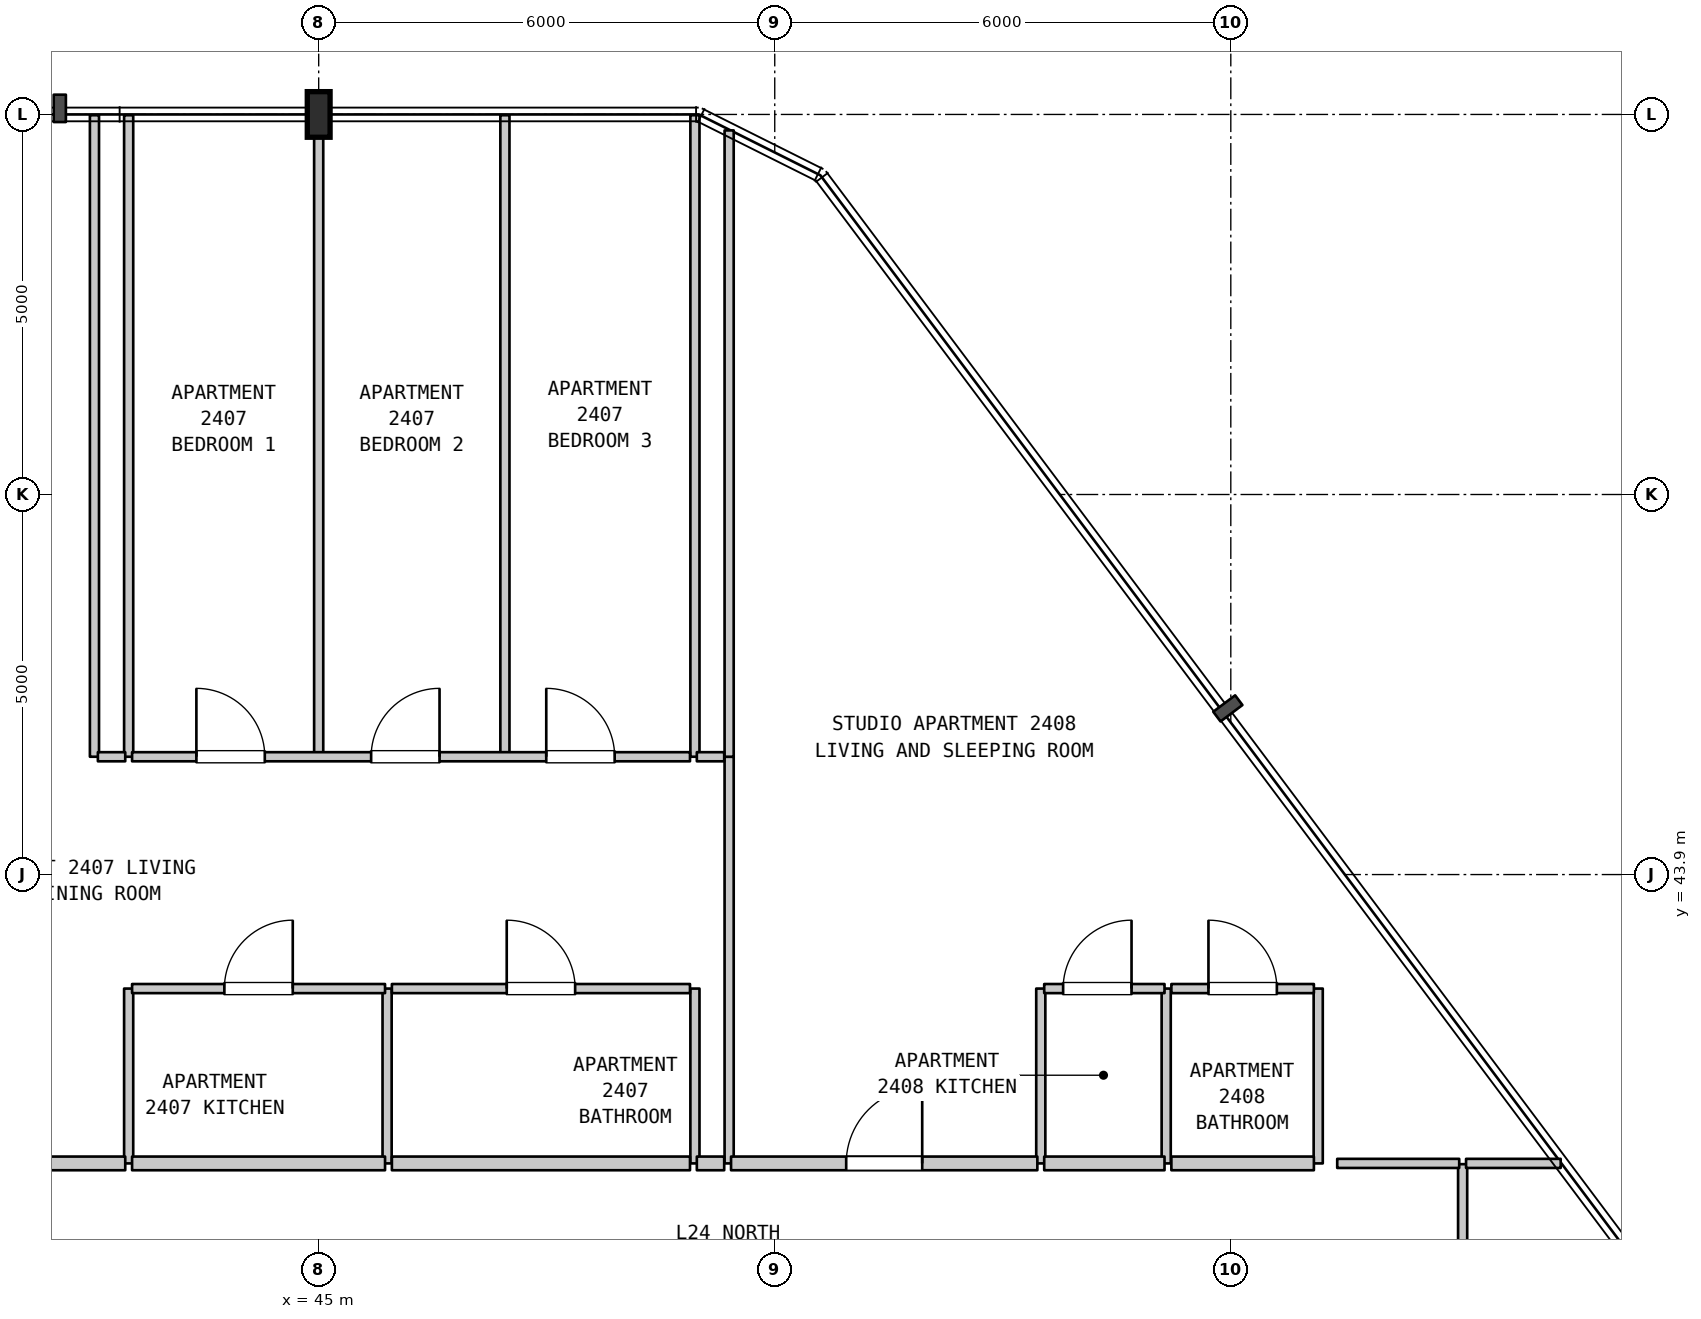
"""IFC4 building model, lengths in metres.
Left out: names, types, materials, properties, quantities, classifications, styles, units other than length and angle.
Written with IfcOpenShell. Run it as: python <this file> out.ifc"""

import sys

from ifc_helpers import new_model, si_unit, direction, frame, frame_2d, origin, origin_2d, place, context, subcontext, project, spatial, rectangle, i_section, extrude, element, fill, save


model = new_model("IFC4")
c1 = context("Model", 3, precision=1e-05, world=origin(), true_north=direction((0.0, 1.0)))
c2 = subcontext(c1, "Body", "Model", "MODEL_VIEW")
j1 = project(units=[si_unit("LENGTHUNIT", "METRE"), si_unit("PLANEANGLEUNIT", "RADIAN")], contexts=[c1])
p1 = place(None, origin())
s1 = spatial("IfcSite", under=j1, at=p1, CompositionType="ELEMENT")
p2 = place(p1, origin())
s2 = spatial("IfcBuilding", under=s1, at=p2, CompositionType="ELEMENT")
p3 = place(p2, frame((0.0, 0.0, 102.0)))
s3 = spatial("IfcBuildingStorey", under=s2, at=p3, CompositionType="ELEMENT", Elevation=102.0)
p4 = place(p3, frame((45.0, 53.9, 0.0), z_axis=(0.0, 0.0, 1.0), x_axis=(1.0, 0.0, 0.0)))
e1 = element("IfcColumn", 1, at=p4, inside=s3, PredefinedType="COLUMN", context=c2, shape_type="SweptSolid", body=[
    extrude(i_section(OverallWidth=0.3, OverallDepth=0.6, WebThickness=0.015, FlangeThickness=0.03, FilletRadius=0.027, at=origin_2d()), origin(), (0.0, 0.0, 1.0), 3.7),
])
p5 = place(p3, frame((42.05, 45.45, 0.0), z_axis=(0.0, 0.0, 1.0), x_axis=(0.0, 1.0, 0.0)))
e2 = element("IfcWall", 2, at=p5, inside=s3, PredefinedType="PARTITIONING", context=c2, shape_type="SweptSolid", body=[
    extrude(rectangle(XDim=8.44, YDim=0.12, at=frame_2d((4.22, 0.0))), origin(), (0.0, 0.0, 1.0), 3.385),
])
p6 = place(p3, frame((42.5, 40.1, 0.0), z_axis=(0.0, 0.0, 1.0), x_axis=(0.0, 1.0, 0.0)))
e3 = element("IfcWall", 3, at=p6, inside=s3, PredefinedType="PARTITIONING", context=c2, shape_type="SweptSolid", body=[
    extrude(rectangle(XDim=2.3, YDim=0.12, at=frame_2d((1.15, 0.0))), origin(), (0.0, 0.0, 1.0), 3.385),
])
for number, where, z_axis, x_axis in (
    (4, (42.5, 45.45, 0.0), (0.0, 0.0, 1.0), (0.0, 1.0, 0.0)),
    (5, (45.0, 45.45, 0.0), (0.0, 0.0, 1.0), (0.0, 1.0, 0.0)),
):
    element("IfcWall", number, at=place(p3, frame(where, z_axis=z_axis, x_axis=x_axis)), inside=s3, PredefinedType="PARTITIONING", context=c2, shape_type="SweptSolid", body=[
        extrude(rectangle(XDim=8.44, YDim=0.12, at=frame_2d((4.22, 0.0))), origin(), (0.0, 0.0, 1.0), 3.385),
    ])
p7 = place(p3, frame((45.9, 40.1, 0.0), z_axis=(0.0, 0.0, 1.0), x_axis=(0.0, 1.0, 0.0)))
e6 = element("IfcWall", 6, at=p7, inside=s3, PredefinedType="PARTITIONING", context=c2, shape_type="SweptSolid", body=[
    extrude(rectangle(XDim=2.3, YDim=0.12, at=frame_2d((1.15, 0.0))), origin(), (0.0, 0.0, 1.0), 3.385),
])
p8 = place(p3, frame((47.45, 45.45, 0.0), z_axis=(0.0, 0.0, 1.0), x_axis=(0.0, 1.0, 0.0)))
e7 = element("IfcWall", 7, at=p8, inside=s3, PredefinedType="PARTITIONING", context=c2, shape_type="SweptSolid", body=[
    extrude(rectangle(XDim=8.44, YDim=0.12, at=frame_2d((4.22, 0.0))), origin(), (0.0, 0.0, 1.0), 3.385),
])
p9 = place(p3, frame((49.95, 40.1, 0.0), z_axis=(0.0, 0.0, 1.0), x_axis=(0.0, 1.0, 0.0)))
e8 = element("IfcWall", 8, at=p9, inside=s3, PredefinedType="PARTITIONING", context=c2, shape_type="SweptSolid", body=[
    extrude(rectangle(XDim=2.3, YDim=0.12, at=frame_2d((1.15, 0.0))), origin(), (0.0, 0.0, 1.0), 3.385),
])
p10 = place(p3, frame((49.95, 45.45, 0.0), z_axis=(0.0, 0.0, 1.0), x_axis=(0.0, 1.0, 0.0)))
e9 = element("IfcWall", 9, at=p10, inside=s3, PredefinedType="PARTITIONING", context=c2, shape_type="SweptSolid", body=[
    extrude(rectangle(XDim=8.44, YDim=0.12, at=frame_2d((4.22, 0.0))), origin(), (0.0, 0.0, 1.0), 3.385),
])
p11 = place(p3, frame((50.4, 40.1, 0.0), z_axis=(0.0, 0.0, 1.0), x_axis=(0.0, 1.0, 0.0)))
e10 = element("IfcWall", 10, at=p11, inside=s3, PredefinedType="PARTITIONING", context=c2, shape_type="SweptSolid", body=[
    extrude(rectangle(XDim=5.35, YDim=0.12, at=frame_2d((2.675, 0.0))), origin(), (0.0, 0.0, 1.0), 3.385),
])
p12 = place(p3, frame((50.4, 45.45, 0.0), z_axis=(0.0, 0.0, 1.0), x_axis=(0.0, 1.0, 0.0)))
e11 = element("IfcWall", 11, at=p12, inside=s3, PredefinedType="PARTITIONING", context=c2, shape_type="SweptSolid", body=[
    extrude(rectangle(XDim=8.24, YDim=0.12, at=frame_2d((4.12, 0.0))), origin(), (0.0, 0.0, 1.0), 3.385),
])
for number, where, z_axis, x_axis in (
    (12, (54.5, 40.1, 0.0), (0.0, 0.0, 1.0), (0.0, 1.0, 0.0)),
    (13, (56.15, 40.1, 0.0), (0.0, 0.0, 1.0), (0.0, 1.0, 0.0)),
    (14, (58.15, 40.1, 0.0), (0.0, 0.0, 1.0), (0.0, 1.0, 0.0)),
):
    element("IfcWall", number, at=place(p3, frame(where, z_axis=z_axis, x_axis=x_axis)), inside=s3, PredefinedType="PARTITIONING", context=c2, shape_type="SweptSolid", body=[
        extrude(rectangle(XDim=2.3, YDim=0.12, at=frame_2d((1.15, 0.0))), origin(), (0.0, 0.0, 1.0), 3.385),
    ])
p13 = place(p3, frame((60.05, 37.89, 0.0), z_axis=(0.0, 0.0, 1.0), x_axis=(0.0, 1.0, 0.0)))
e15 = element("IfcWall", 15, at=p13, inside=s3, PredefinedType="PARTITIONING", context=c2, shape_type="SweptSolid", body=[
    extrude(rectangle(XDim=2.2, YDim=0.12, at=frame_2d((1.1, 0.0))), origin(), (0.0, 0.0, 1.0), 3.385),
])
p14 = place(p3, frame((37.155, 40.1, 0.0), z_axis=(0.0, 0.0, 1.0), x_axis=(1.0, 0.0, 0.0)))
e16 = element("IfcWall", 16, at=p14, inside=s3, PredefinedType="STANDARD", context=c2, shape_type="SweptSolid", body=[
    extrude(rectangle(XDim=5.3, YDim=0.18, at=frame_2d((2.65, 0.0))), origin(), (0.0, 0.0, 1.0), 3.385),
])
p15 = place(p14, frame((2.15, 0.0, 0.0)))
e17 = element("IfcOpeningElement", 17, at=p15, cuts=e16, PredefinedType="OPENING", context=c2, shape_type="SweptSolid", body=[
    extrude(rectangle(XDim=1.0, YDim=2.15, at=frame_2d((0.5, 1.075))), frame((0.0, 0.1, 0.0), z_axis=(0.0, -1.0, 0.0), x_axis=(1.0, 0.0, 0.0)), (0.0, 0.0, 1.0), 0.2),
])
p16 = place(p3, frame((42.545, 40.1, 0.0), z_axis=(0.0, 0.0, 1.0), x_axis=(1.0, 0.0, 0.0)))
e18 = element("IfcWall", 18, at=p16, inside=s3, PredefinedType="STANDARD", context=c2, shape_type="SweptSolid", body=[
    extrude(rectangle(XDim=3.328, YDim=0.18, at=frame_2d((1.664, 0.0))), origin(), (0.0, 0.0, 1.0), 3.385),
])
p17 = place(p3, frame((45.963, 40.1, 0.0), z_axis=(0.0, 0.0, 1.0), x_axis=(1.0, 0.0, 0.0)))
e19 = element("IfcWall", 19, at=p17, inside=s3, PredefinedType="STANDARD", context=c2, shape_type="SweptSolid", body=[
    extrude(rectangle(XDim=3.922, YDim=0.18, at=frame_2d((1.961, 0.0))), origin(), (0.0, 0.0, 1.0), 3.385),
])
p18 = place(p3, frame((49.975, 40.1, 0.0), z_axis=(0.0, 0.0, 1.0), x_axis=(1.0, 0.0, 0.0)))
e20 = element("IfcWall", 20, at=p18, inside=s3, PredefinedType="STANDARD", context=c2, shape_type="SweptSolid", body=[
    extrude(rectangle(XDim=0.36, YDim=0.18, at=frame_2d((0.18, 0.0))), origin(), (0.0, 0.0, 1.0), 3.385),
])
p19 = place(p3, frame((50.425, 40.1, 0.0), z_axis=(0.0, 0.0, 1.0), x_axis=(1.0, 0.0, 0.0)))
e21 = element("IfcWall", 21, at=p19, inside=s3, PredefinedType="STANDARD", context=c2, shape_type="SweptSolid", body=[
    extrude(rectangle(XDim=4.03, YDim=0.18, at=frame_2d((2.015, 0.0))), origin(), (0.0, 0.0, 1.0), 3.385),
])
p20 = place(p19, frame((1.515, 0.0, 0.0)))
e22 = element("IfcOpeningElement", 22, at=p20, cuts=e21, PredefinedType="OPENING", context=c2, shape_type="SweptSolid", body=[
    extrude(rectangle(XDim=1.0, YDim=2.15, at=frame_2d((0.5, 1.075))), frame((0.0, 0.1, 0.0), z_axis=(0.0, -1.0, 0.0), x_axis=(1.0, 0.0, 0.0)), (0.0, 0.0, 1.0), 0.2),
])
p21 = place(p3, frame((54.545, 40.1, 0.0), z_axis=(0.0, 0.0, 1.0), x_axis=(1.0, 0.0, 0.0)))
e23 = element("IfcWall", 23, at=p21, inside=s3, PredefinedType="STANDARD", context=c2, shape_type="SweptSolid", body=[
    extrude(rectangle(XDim=1.583, YDim=0.18, at=frame_2d((0.792, 0.0))), origin(), (0.0, 0.0, 1.0), 3.385),
])
p22 = place(p3, frame((56.218, 40.1, 0.0), z_axis=(0.0, 0.0, 1.0), x_axis=(1.0, 0.0, 0.0)))
e24 = element("IfcWall", 24, at=p22, inside=s3, PredefinedType="STANDARD", context=c2, shape_type="SweptSolid", body=[
    extrude(rectangle(XDim=1.875, YDim=0.18, at=frame_2d((0.938, 0.0))), origin(), (0.0, 0.0, 1.0), 3.385),
])
p23 = place(p3, frame((58.4, 40.1, 0.0), z_axis=(0.0, 0.0, 1.0), x_axis=(1.0, 0.0, 0.0)))
e25 = element("IfcWall", 25, at=p23, inside=s3, PredefinedType="PARTITIONING", context=c2, shape_type="SweptSolid", body=[
    extrude(rectangle(XDim=1.605, YDim=0.12, at=frame_2d((0.802, 0.0))), origin(), (0.0, 0.0, 1.0), 3.385),
])
p24 = place(p3, frame((60.095, 40.1, 0.0), z_axis=(0.0, 0.0, 1.0), x_axis=(1.0, 0.0, 0.0)))
e26 = element("IfcWall", 26, at=p24, inside=s3, PredefinedType="PARTITIONING", context=c2, shape_type="SweptSolid", body=[
    extrude(rectangle(XDim=1.245, YDim=0.12, at=frame_2d((0.623, 0.0))), origin(), (0.0, 0.0, 1.0), 3.385),
])
p25 = place(p3, frame((42.545, 42.4, 0.0), z_axis=(0.0, 0.0, 1.0), x_axis=(1.0, 0.0, 0.0)))
e27 = element("IfcWall", 27, at=p25, inside=s3, PredefinedType="PARTITIONING", context=c2, shape_type="SweptSolid", body=[
    extrude(rectangle(XDim=3.328, YDim=0.12, at=frame_2d((1.664, 0.0))), origin(), (0.0, 0.0, 1.0), 3.385),
])
p26 = place(p25, frame((1.214, 0.0, 0.0)))
e28 = element("IfcOpeningElement", 28, at=p26, cuts=e27, PredefinedType="OPENING", context=c2, shape_type="SweptSolid", body=[
    extrude(rectangle(XDim=0.9, YDim=2.15, at=frame_2d((0.45, 1.075))), frame((0.0, 0.07, 0.0), z_axis=(0.0, -1.0, 0.0), x_axis=(1.0, 0.0, 0.0)), (0.0, 0.0, 1.0), 0.14),
])
p27 = place(p3, frame((45.963, 42.4, 0.0), z_axis=(0.0, 0.0, 1.0), x_axis=(1.0, 0.0, 0.0)))
e29 = element("IfcWall", 29, at=p27, inside=s3, PredefinedType="PARTITIONING", context=c2, shape_type="SweptSolid", body=[
    extrude(rectangle(XDim=3.922, YDim=0.12, at=frame_2d((1.961, 0.0))), origin(), (0.0, 0.0, 1.0), 3.385),
])
p28 = place(p27, frame((1.511, 0.0, 0.0)))
e30 = element("IfcOpeningElement", 30, at=p28, cuts=e29, PredefinedType="OPENING", context=c2, shape_type="SweptSolid", body=[
    extrude(rectangle(XDim=0.9, YDim=2.1, at=frame_2d((0.45, 1.05))), frame((0.0, 0.07, 0.0), z_axis=(0.0, -1.0, 0.0), x_axis=(1.0, 0.0, 0.0)), (0.0, 0.0, 1.0), 0.14),
])
p29 = place(p3, frame((54.545, 42.4, 0.0), z_axis=(0.0, 0.0, 1.0), x_axis=(1.0, 0.0, 0.0)))
e31 = element("IfcWall", 31, at=p29, inside=s3, PredefinedType="PARTITIONING", context=c2, shape_type="SweptSolid", body=[
    extrude(rectangle(XDim=1.583, YDim=0.12, at=frame_2d((0.792, 0.0))), origin(), (0.0, 0.0, 1.0), 3.385),
])
p30 = place(p29, frame((0.249, 0.0, 0.0)))
e32 = element("IfcOpeningElement", 32, at=p30, cuts=e31, PredefinedType="OPENING", context=c2, shape_type="SweptSolid", body=[
    extrude(rectangle(XDim=0.9, YDim=2.15, at=frame_2d((0.45, 1.075))), frame((0.0, 0.07, 0.0), z_axis=(0.0, -1.0, 0.0), x_axis=(1.0, 0.0, 0.0)), (0.0, 0.0, 1.0), 0.14),
])
p31 = place(p3, frame((56.218, 42.4, 0.0), z_axis=(0.0, 0.0, 1.0), x_axis=(1.0, 0.0, 0.0)))
e33 = element("IfcWall", 33, at=p31, inside=s3, PredefinedType="PARTITIONING", context=c2, shape_type="SweptSolid", body=[
    extrude(rectangle(XDim=1.875, YDim=0.12, at=frame_2d((0.938, 0.0))), origin(), (0.0, 0.0, 1.0), 3.385),
])
p32 = place(p31, frame((0.488, 0.0, 0.0)))
e34 = element("IfcOpeningElement", 34, at=p32, cuts=e33, PredefinedType="OPENING", context=c2, shape_type="SweptSolid", body=[
    extrude(rectangle(XDim=0.9, YDim=2.1, at=frame_2d((0.45, 1.05))), frame((0.0, 0.07, 0.0), z_axis=(0.0, -1.0, 0.0), x_axis=(1.0, 0.0, 0.0)), (0.0, 0.0, 1.0), 0.14),
])
p33 = place(p3, frame((42.095, 45.45, 0.0), z_axis=(0.0, 0.0, 1.0), x_axis=(1.0, 0.0, 0.0)))
e35 = element("IfcWall", 35, at=p33, inside=s3, PredefinedType="PARTITIONING", context=c2, shape_type="SweptSolid", body=[
    extrude(rectangle(XDim=0.36, YDim=0.12, at=frame_2d((0.18, 0.0))), origin(), (0.0, 0.0, 1.0), 3.385),
])
p34 = place(p3, frame((42.545, 45.45, 0.0), z_axis=(0.0, 0.0, 1.0), x_axis=(1.0, 0.0, 0.0)))
e36 = element("IfcWall", 36, at=p34, inside=s3, PredefinedType="PARTITIONING", context=c2, shape_type="SweptSolid", body=[
    extrude(rectangle(XDim=7.34, YDim=0.12, at=frame_2d((3.67, 0.0))), origin(), (0.0, 0.0, 1.0), 3.385),
])
p35 = place(p34, frame((0.846, 0.0, 0.0)))
e37 = element("IfcOpeningElement", 37, at=p35, cuts=e36, PredefinedType="OPENING", context=c2, shape_type="SweptSolid", body=[
    extrude(rectangle(XDim=0.9, YDim=2.15, at=frame_2d((0.45, 1.075))), frame((0.0, 0.07, 0.0), z_axis=(0.0, -1.0, 0.0), x_axis=(1.0, 0.0, 0.0)), (0.0, 0.0, 1.0), 0.14),
])
p36 = place(p34, frame((3.145, 0.0, 0.0)))
e38 = element("IfcOpeningElement", 38, at=p36, cuts=e36, PredefinedType="OPENING", context=c2, shape_type="SweptSolid", body=[
    extrude(rectangle(XDim=0.9, YDim=2.15, at=frame_2d((0.45, 1.075))), frame((0.0, 0.07, 0.0), z_axis=(0.0, -1.0, 0.0), x_axis=(1.0, 0.0, 0.0)), (0.0, 0.0, 1.0), 0.14),
])
p37 = place(p34, frame((5.449, 0.0, 0.0)))
e39 = element("IfcOpeningElement", 39, at=p37, cuts=e36, PredefinedType="OPENING", context=c2, shape_type="SweptSolid", body=[
    extrude(rectangle(XDim=0.9, YDim=2.15, at=frame_2d((0.45, 1.075))), frame((0.0, 0.07, 0.0), z_axis=(0.0, -1.0, 0.0), x_axis=(1.0, 0.0, 0.0)), (0.0, 0.0, 1.0), 0.14),
])
p38 = place(p3, frame((49.975, 45.45, 0.0), z_axis=(0.0, 0.0, 1.0), x_axis=(1.0, 0.0, 0.0)))
e40 = element("IfcWall", 40, at=p38, inside=s3, PredefinedType="PARTITIONING", context=c2, shape_type="SweptSolid", body=[
    extrude(rectangle(XDim=0.36, YDim=0.12, at=frame_2d((0.18, 0.0))), origin(), (0.0, 0.0, 1.0), 3.385),
])
p39 = place(p20, origin())
e41 = element("IfcDoor", 41, at=p39, inside=s3, OperationType="SINGLE_SWING_RIGHT", PredefinedType="DOOR", context=c2, shape_type="SweptSolid", body=[
    extrude(rectangle(XDim=1.0, YDim=2.15, at=frame_2d((0.5, 1.075))), frame((0.0, 0.025, 0.0), z_axis=(0.0, -1.0, 0.0), x_axis=(1.0, 0.0, 0.0)), (0.0, 0.0, 1.0), 0.05),
])
fill(e22, e41)
p40 = place(p26, origin())
e42 = element("IfcDoor", 42, at=p40, inside=s3, OperationType="SINGLE_SWING_RIGHT", PredefinedType="DOOR", context=c2, shape_type="SweptSolid", body=[
    extrude(rectangle(XDim=0.9, YDim=2.15, at=frame_2d((0.45, 1.075))), frame((0.0, 0.025, 0.0), z_axis=(0.0, -1.0, 0.0), x_axis=(1.0, 0.0, 0.0)), (0.0, 0.0, 1.0), 0.05),
])
fill(e28, e42)
p41 = place(p28, origin())
e43 = element("IfcDoor", 43, at=p41, inside=s3, OperationType="SINGLE_SWING_LEFT", PredefinedType="DOOR", context=c2, shape_type="SweptSolid", body=[
    extrude(rectangle(XDim=0.9, YDim=2.1, at=frame_2d((0.45, 1.05))), frame((0.0, 0.025, 0.0), z_axis=(0.0, -1.0, 0.0), x_axis=(1.0, 0.0, 0.0)), (0.0, 0.0, 1.0), 0.05),
])
fill(e30, e43)
p42 = place(p30, origin())
e44 = element("IfcDoor", 44, at=p42, inside=s3, OperationType="SINGLE_SWING_RIGHT", PredefinedType="DOOR", context=c2, shape_type="SweptSolid", body=[
    extrude(rectangle(XDim=0.9, YDim=2.15, at=frame_2d((0.45, 1.075))), frame((0.0, 0.025, 0.0), z_axis=(0.0, -1.0, 0.0), x_axis=(1.0, 0.0, 0.0)), (0.0, 0.0, 1.0), 0.05),
])
fill(e32, e44)
p43 = place(p32, origin())
e45 = element("IfcDoor", 45, at=p43, inside=s3, OperationType="SINGLE_SWING_LEFT", PredefinedType="DOOR", context=c2, shape_type="SweptSolid", body=[
    extrude(rectangle(XDim=0.9, YDim=2.1, at=frame_2d((0.45, 1.05))), frame((0.0, 0.025, 0.0), z_axis=(0.0, -1.0, 0.0), x_axis=(1.0, 0.0, 0.0)), (0.0, 0.0, 1.0), 0.05),
])
fill(e34, e45)
p44 = place(p35, origin())
e46 = element("IfcDoor", 46, at=p44, inside=s3, OperationType="SINGLE_SWING_LEFT", PredefinedType="DOOR", context=c2, shape_type="SweptSolid", body=[
    extrude(rectangle(XDim=0.9, YDim=2.15, at=frame_2d((0.45, 1.075))), frame((0.0, 0.025, 0.0), z_axis=(0.0, -1.0, 0.0), x_axis=(1.0, 0.0, 0.0)), (0.0, 0.0, 1.0), 0.05),
])
fill(e37, e46)
p45 = place(p36, origin())
e47 = element("IfcDoor", 47, at=p45, inside=s3, OperationType="SINGLE_SWING_RIGHT", PredefinedType="DOOR", context=c2, shape_type="SweptSolid", body=[
    extrude(rectangle(XDim=0.9, YDim=2.15, at=frame_2d((0.45, 1.075))), frame((0.0, 0.025, 0.0), z_axis=(0.0, -1.0, 0.0), x_axis=(1.0, 0.0, 0.0)), (0.0, 0.0, 1.0), 0.05),
])
fill(e38, e47)
p46 = place(p37, origin())
e48 = element("IfcDoor", 48, at=p46, inside=s3, OperationType="SINGLE_SWING_LEFT", PredefinedType="DOOR", context=c2, shape_type="SweptSolid", body=[
    extrude(rectangle(XDim=0.9, YDim=2.15, at=frame_2d((0.45, 1.075))), frame((0.0, 0.025, 0.0), z_axis=(0.0, -1.0, 0.0), x_axis=(1.0, 0.0, 0.0)), (0.0, 0.0, 1.0), 0.05),
])
fill(e39, e48)
save(model, sys.argv[1])
